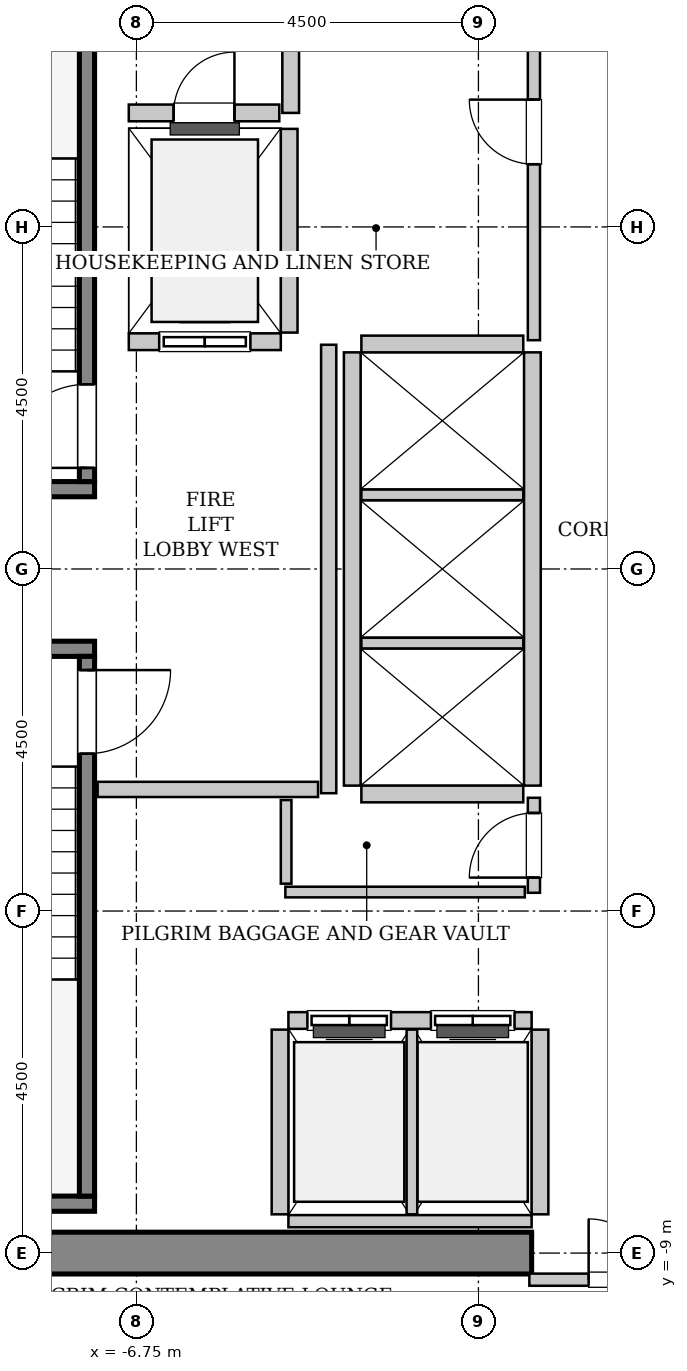
"""IFC4 building model, lengths in metres.
Left out: names, types, materials, properties, quantities, classifications, styles, units other than length and angle.
Written with IfcOpenShell. Run it as: python <this file> out.ifc"""

import sys

from ifc_helpers import new_model, si_unit, direction, frame, frame_2d, origin, place, context, subcontext, project, spatial, rectangle, extrude, source, transform, mapped, element, fill, save


model = new_model("IFC4")
c1 = context("Model", 3, precision=1e-05, world=origin(), true_north=direction((0.0, 1.0)))
c2 = subcontext(c1, "Body", "Model", "MODEL_VIEW")
j1 = project(units=[si_unit("LENGTHUNIT", "METRE"), si_unit("PLANEANGLEUNIT", "RADIAN")], contexts=[c1])
p1 = place(None, origin())
s1 = spatial("IfcSite", under=j1, at=p1, CompositionType="ELEMENT")
p2 = place(p1, origin())
s2 = spatial("IfcBuilding", under=s1, at=p2, CompositionType="ELEMENT")
p3 = place(p2, frame((0.0, 0.0, 175.4)))
s3 = spatial("IfcBuildingStorey", under=s2, at=p3, CompositionType="ELEMENT", Elevation=175.4)
m1 = source(origin(), c2, "Body", "SweptSolid", [
    extrude(rectangle(XDim=9.975, YDim=0.55, at=frame_2d((4.987, 0.0))), origin(), (0.0, 0.0, 1.0), 3.8),
])
p4 = place(p3, frame((-11.525, -9.0, 0.0), z_axis=(0.0, 0.0, 1.0), x_axis=(1.0, 0.0, 0.0)))
e1 = element("IfcWall", 1, at=p4, inside=s3, PredefinedType="SHEAR", context=c2, shape_type="MappedRepresentation", body=[
    mapped(m1, transform((0.0, 0.0, 0.0), x_axis=(1.0, 0.0, 0.0), y_axis=(0.0, 1.0, 0.0), z_axis=(0.0, 0.0, 1.0), scale=1.0)),
])
m2 = source(origin(), c2, "Body", "SweptSolid", [
    extrude(rectangle(XDim=3.4, YDim=0.2, at=frame_2d((1.7, 0.0))), origin(), (0.0, 0.0, 1.0), 3.8),
])
p5 = place(p3, frame((-7.3, 1.05, 0.0), z_axis=(0.0, 0.0, 1.0), x_axis=(-1.0, 0.0, 0.0)))
e2 = element("IfcWall", 2, at=p5, inside=s3, PredefinedType="SOLIDWALL", context=c2, shape_type="MappedRepresentation", body=[
    mapped(m2, transform((0.0, 0.0, 0.0), x_axis=(1.0, 0.0, 0.0), y_axis=(0.0, 1.0, 0.0), z_axis=(0.0, 0.0, 1.0), scale=1.0)),
])
m3 = source(origin(), c2, "Body", "SweptSolid", [
    extrude(rectangle(XDim=7.1, YDim=0.2, at=frame_2d((3.55, 0.0))), origin(), (0.0, 0.0, 1.0), 3.8),
])
p6 = place(p3, frame((-7.4, 1.15, 0.0), z_axis=(0.0, 0.0, 1.0), x_axis=(0.0, 1.0, 0.0)))
e3 = element("IfcWall", 3, at=p6, inside=s3, PredefinedType="SOLIDWALL", context=c2, shape_type="MappedRepresentation", body=[
    mapped(m3, transform((0.0, 0.0, 0.0), x_axis=(1.0, 0.0, 0.0), y_axis=(0.0, 1.0, 0.0), z_axis=(0.0, 0.0, 1.0), scale=1.0)),
])
p7 = place(p6, frame((0.18, 0.0, 0.0)))
e4 = element("IfcOpeningElement", 4, at=p7, cuts=e3, PredefinedType="OPENING", context=c2, shape_type="SweptSolid", body=[
    extrude(rectangle(XDim=1.1, YDim=2.15, at=frame_2d((0.55, 1.075))), frame((0.0, 0.11, 0.0), z_axis=(0.0, -1.0, 0.0), x_axis=(1.0, 0.0, 0.0)), (0.0, 0.0, 1.0), 0.22),
])
p8 = place(p3, frame((-10.7, -1.05, 0.0), z_axis=(0.0, 0.0, 1.0), x_axis=(1.0, 0.0, 0.0)))
e5 = element("IfcWall", 5, at=p8, inside=s3, PredefinedType="SOLIDWALL", context=c2, shape_type="MappedRepresentation", body=[
    mapped(m2, transform((0.0, 0.0, 0.0), x_axis=(1.0, 0.0, 0.0), y_axis=(0.0, 1.0, 0.0), z_axis=(0.0, 0.0, 1.0), scale=1.0)),
])
m4 = source(origin(), c2, "Body", "SweptSolid", [
    extrude(rectangle(XDim=3.68, YDim=0.2, at=frame_2d((1.84, 0.0))), origin(), (0.0, 0.0, 1.0), 3.8),
])
p9 = place(p3, frame((-10.98, -8.35, 0.0), z_axis=(0.0, 0.0, 1.0), x_axis=(1.0, 0.0, 0.0)))
e6 = element("IfcWall", 6, at=p9, inside=s3, PredefinedType="SOLIDWALL", context=c2, shape_type="MappedRepresentation", body=[
    mapped(m4, transform((0.0, 0.0, 0.0), x_axis=(1.0, 0.0, 0.0), y_axis=(0.0, 1.0, 0.0), z_axis=(0.0, 0.0, 1.0), scale=1.0)),
])
p10 = place(p3, frame((-7.4, -1.15, 0.0), z_axis=(0.0, 0.0, 1.0), x_axis=(0.0, -1.0, 0.0)))
e7 = element("IfcWall", 7, at=p10, inside=s3, PredefinedType="SOLIDWALL", context=c2, shape_type="MappedRepresentation", body=[
    mapped(m3, transform((0.0, 0.0, 0.0), x_axis=(1.0, 0.0, 0.0), y_axis=(0.0, 1.0, 0.0), z_axis=(0.0, 0.0, 1.0), scale=1.0)),
])
p11 = place(p10, frame((0.18, 0.0, 0.0)))
e8 = element("IfcOpeningElement", 8, at=p11, cuts=e7, PredefinedType="OPENING", context=c2, shape_type="SweptSolid", body=[
    extrude(rectangle(XDim=1.1, YDim=2.15, at=frame_2d((0.55, 1.075))), frame((0.0, 0.11, 0.0), z_axis=(0.0, -1.0, 0.0), x_axis=(1.0, 0.0, 0.0)), (0.0, 0.0, 1.0), 0.22),
])
m5 = source(origin(), c2, "Body", "SweptSolid", [
    extrude(rectangle(XDim=2.0, YDim=0.22, at=frame_2d((1.0, 0.0))), origin(), (0.0, 0.0, 1.0), 3.535),
])
p12 = place(p3, frame((-6.85, 2.99, 0.0), z_axis=(0.0, 0.0, 1.0), x_axis=(1.0, 0.0, 0.0)))
e9 = element("IfcWall", 9, at=p12, inside=s3, PredefinedType="SOLIDWALL", context=c2, shape_type="MappedRepresentation", body=[
    mapped(m5, transform((0.0, 0.0, 0.0), x_axis=(1.0, 0.0, 0.0), y_axis=(0.0, 1.0, 0.0), z_axis=(0.0, 0.0, 1.0), scale=1.0)),
])
p13 = place(p12, frame((0.4, 0.0, 0.0)))
e10 = element("IfcOpeningElement", 10, at=p13, cuts=e9, PredefinedType="OPENING", context=c2, shape_type="SweptSolid", body=[
    extrude(rectangle(XDim=1.2, YDim=2.2, at=frame_2d((0.6, 1.1))), frame((0.0, 0.12, 0.0), z_axis=(0.0, -1.0, 0.0), x_axis=(1.0, 0.0, 0.0)), (0.0, 0.0, 1.0), 0.24),
])
m6 = source(origin(), c2, "Body", "SweptSolid", [
    extrude(rectangle(XDim=2.68, YDim=0.22, at=frame_2d((1.34, 0.0))), origin(), (0.0, 0.0, 1.0), 3.535),
])
p14 = place(p3, frame((-4.74, 3.11, 0.0), z_axis=(0.0, 0.0, 1.0), x_axis=(0.0, 1.0, 0.0)))
e11 = element("IfcWall", 11, at=p14, inside=s3, PredefinedType="SOLIDWALL", context=c2, shape_type="MappedRepresentation", body=[
    mapped(m6, transform((0.0, 0.0, 0.0), x_axis=(1.0, 0.0, 0.0), y_axis=(0.0, 1.0, 0.0), z_axis=(0.0, 0.0, 1.0), scale=1.0)),
])
m7 = source(origin(), c2, "Body", "SweptSolid", [
    extrude(rectangle(XDim=3.2, YDim=0.22, at=frame_2d((1.6, 0.0))), origin(), (0.0, 0.0, 1.0), 3.535),
])
p15 = place(p3, frame((-1.55, -5.94, 0.0), z_axis=(0.0, 0.0, 1.0), x_axis=(-1.0, 0.0, 0.0)))
e12 = element("IfcWall", 12, at=p15, inside=s3, PredefinedType="SOLIDWALL", context=c2, shape_type="MappedRepresentation", body=[
    mapped(m7, transform((0.0, 0.0, 0.0), x_axis=(1.0, 0.0, 0.0), y_axis=(0.0, 1.0, 0.0), z_axis=(0.0, 0.0, 1.0), scale=1.0)),
])
p16 = place(p15, frame((1.85, 0.0, 0.0)))
e13 = element("IfcOpeningElement", 13, at=p16, cuts=e12, PredefinedType="OPENING", context=c2, shape_type="SweptSolid", body=[
    extrude(rectangle(XDim=1.1, YDim=2.2, at=frame_2d((0.55, 1.1))), frame((0.0, 0.12, 0.0), z_axis=(0.0, -1.0, 0.0), x_axis=(1.0, 0.0, 0.0)), (0.0, 0.0, 1.0), 0.24),
])
p17 = place(p15, frame((0.225, 0.0, 0.0)))
e14 = element("IfcOpeningElement", 14, at=p17, cuts=e12, PredefinedType="OPENING", context=c2, shape_type="SweptSolid", body=[
    extrude(rectangle(XDim=1.1, YDim=2.2, at=frame_2d((0.55, 1.1))), frame((0.0, 0.12, 0.0), z_axis=(0.0, -1.0, 0.0), x_axis=(1.0, 0.0, 0.0)), (0.0, 0.0, 1.0), 0.24),
])
m8 = source(origin(), c2, "Body", "SweptSolid", [
    extrude(rectangle(XDim=3.2, YDim=0.16, at=frame_2d((1.6, 0.0))), origin(), (0.0, 0.0, 1.0), 2.425),
])
p18 = place(p3, frame((-4.75, -8.58, 0.0), z_axis=(0.0, 0.0, 1.0), x_axis=(1.0, 0.0, 0.0)))
e15 = element("IfcWall", 15, at=p18, inside=s3, PredefinedType="PARTITIONING", context=c2, shape_type="MappedRepresentation", body=[
    mapped(m8, transform((0.0, 0.0, 0.0), x_axis=(1.0, 0.0, 0.0), y_axis=(0.0, 1.0, 0.0), z_axis=(0.0, 0.0, 1.0), scale=1.0)),
])
m9 = source(origin(), c2, "Body", "SweptSolid", [
    extrude(rectangle(XDim=2.43, YDim=0.22, at=frame_2d((1.215, 0.0))), origin(), (0.0, 0.0, 1.0), 3.535),
])
p19 = place(p3, frame((-4.86, -6.06, 0.0), z_axis=(0.0, 0.0, 1.0), x_axis=(0.0, -1.0, 0.0)))
e16 = element("IfcWall", 16, at=p19, inside=s3, PredefinedType="SOLIDWALL", context=c2, shape_type="MappedRepresentation", body=[
    mapped(m9, transform((0.0, 0.0, 0.0), x_axis=(1.0, 0.0, 0.0), y_axis=(0.0, 1.0, 0.0), z_axis=(0.0, 0.0, 1.0), scale=1.0)),
])
m10 = source(origin(), c2, "Body", "SweptSolid", [
    extrude(rectangle(XDim=2.43, YDim=0.14, at=frame_2d((1.215, 0.0))), origin(), (0.0, 0.0, 1.0), 3.535),
])
p20 = place(p3, frame((-3.125, -8.49, 0.0), z_axis=(0.0, 0.0, 1.0), x_axis=(0.0, 1.0, 0.0)))
e17 = element("IfcWall", 17, at=p20, inside=s3, PredefinedType="PARTITIONING", context=c2, shape_type="MappedRepresentation", body=[
    mapped(m10, transform((0.0, 0.0, 0.0), x_axis=(1.0, 0.0, 0.0), y_axis=(0.0, 1.0, 0.0), z_axis=(0.0, 0.0, 1.0), scale=1.0)),
])
p21 = place(p3, frame((-1.44, -8.49, 0.0), z_axis=(0.0, 0.0, 1.0), x_axis=(0.0, 1.0, 0.0)))
e18 = element("IfcWall", 18, at=p21, inside=s3, PredefinedType="SOLIDWALL", context=c2, shape_type="MappedRepresentation", body=[
    mapped(m9, transform((0.0, 0.0, 0.0), x_axis=(1.0, 0.0, 0.0), y_axis=(0.0, 1.0, 0.0), z_axis=(0.0, 0.0, 1.0), scale=1.0)),
])
m11 = source(origin(), c2, "Body", "SweptSolid", [
    extrude(rectangle(XDim=5.7, YDim=0.22, at=frame_2d((2.85, 0.0))), origin(), (0.0, 0.0, 1.0), 3.535),
])
for number, where, z_axis, x_axis in (
    (19, (-1.54, -2.85, 0.0), (0.0, 0.0, 1.0), (0.0, 1.0, 0.0)),
    (20, (-3.91, 2.85, 0.0), (0.0, 0.0, 1.0), (0.0, -1.0, 0.0)),
):
    element("IfcWall", number, at=place(p3, frame(where, z_axis=z_axis, x_axis=x_axis)), inside=s3, PredefinedType="SOLIDWALL", context=c2, shape_type="MappedRepresentation", body=[
        mapped(m11, transform((0.0, 0.0, 0.0), x_axis=(1.0, 0.0, 0.0), y_axis=(0.0, 1.0, 0.0), z_axis=(0.0, 0.0, 1.0), scale=1.0)),
    ])
m12 = source(origin(), c2, "Body", "SweptSolid", [
    extrude(rectangle(XDim=2.13, YDim=0.22, at=frame_2d((1.065, 0.0))), origin(), (0.0, 0.0, 1.0), 3.535),
])
p22 = place(p3, frame((-3.79, -2.96, 0.0), z_axis=(0.0, 0.0, 1.0), x_axis=(1.0, 0.0, 0.0)))
e21 = element("IfcWall", 21, at=p22, inside=s3, PredefinedType="SOLIDWALL", context=c2, shape_type="MappedRepresentation", body=[
    mapped(m12, transform((0.0, 0.0, 0.0), x_axis=(1.0, 0.0, 0.0), y_axis=(0.0, 1.0, 0.0), z_axis=(0.0, 0.0, 1.0), scale=1.0)),
])
m13 = source(origin(), c2, "Body", "SweptSolid", [
    extrude(rectangle(XDim=2.13, YDim=0.14, at=frame_2d((1.065, 0.0))), origin(), (0.0, 0.0, 1.0), 3.535),
])
for number, where, z_axis, x_axis in (
    (22, (-3.79, -0.975, 0.0), (0.0, 0.0, 1.0), (1.0, 0.0, 0.0)),
    (23, (-3.79, 0.975, 0.0), (0.0, 0.0, 1.0), (1.0, 0.0, 0.0)),
):
    element("IfcWall", number, at=place(p3, frame(where, z_axis=z_axis, x_axis=x_axis)), inside=s3, PredefinedType="PARTITIONING", context=c2, shape_type="MappedRepresentation", body=[
        mapped(m13, transform((0.0, 0.0, 0.0), x_axis=(1.0, 0.0, 0.0), y_axis=(0.0, 1.0, 0.0), z_axis=(0.0, 0.0, 1.0), scale=1.0)),
    ])
p23 = place(p3, frame((-1.66, 2.96, 0.0), z_axis=(0.0, 0.0, 1.0), x_axis=(-1.0, 0.0, 0.0)))
e24 = element("IfcWall", 24, at=p23, inside=s3, PredefinedType="SOLIDWALL", context=c2, shape_type="MappedRepresentation", body=[
    mapped(m12, transform((0.0, 0.0, 0.0), x_axis=(1.0, 0.0, 0.0), y_axis=(0.0, 1.0, 0.0), z_axis=(0.0, 0.0, 1.0), scale=1.0)),
])
m14 = source(origin(), c2, "Body", "SweptSolid", [
    extrude(rectangle(XDim=2.25, YDim=0.22, at=frame_2d((1.125, 0.0))), origin(), (0.0, 0.0, 1.0), 3.535),
])
p24 = place(p3, frame((-4.72, 6.0, 0.0), z_axis=(0.0, 0.0, 1.0), x_axis=(0.0, 1.0, 0.0)))
e25 = element("IfcWall", 25, at=p24, inside=s3, PredefinedType="SOLIDWALL", context=c2, shape_type="MappedRepresentation", body=[
    mapped(m14, transform((0.0, 0.0, 0.0), x_axis=(1.0, 0.0, 0.0), y_axis=(0.0, 1.0, 0.0), z_axis=(0.0, 0.0, 1.0), scale=1.0)),
])
m15 = source(origin(), c2, "Body", "SweptSolid", [
    extrude(rectangle(XDim=1.98, YDim=0.22, at=frame_2d((0.99, 0.0))), origin(), (0.0, 0.0, 1.0), 3.535),
])
p25 = place(p3, frame((-6.85, 6.0, 0.0), z_axis=(0.0, 0.0, 1.0), x_axis=(1.0, 0.0, 0.0)))
e26 = element("IfcWall", 26, at=p25, inside=s3, PredefinedType="SOLIDWALL", context=c2, shape_type="MappedRepresentation", body=[
    mapped(m15, transform((0.0, 0.0, 0.0), x_axis=(1.0, 0.0, 0.0), y_axis=(0.0, 1.0, 0.0), z_axis=(0.0, 0.0, 1.0), scale=1.0)),
])
p26 = place(p25, frame((0.59, 0.0, 0.0)))
e27 = element("IfcOpeningElement", 27, at=p26, cuts=e26, PredefinedType="OPENING", context=c2, shape_type="SweptSolid", body=[
    extrude(rectangle(XDim=0.8, YDim=2.0, at=frame_2d((0.4, 1.0))), frame((0.0, 0.12, 0.0), z_axis=(0.0, -1.0, 0.0), x_axis=(1.0, 0.0, 0.0)), (0.0, 0.0, 1.0), 0.24),
])
m16 = source(origin(), c2, "Body", "SweptSolid", [
    extrude(rectangle(XDim=5.9, YDim=0.2, at=frame_2d((2.95, 0.0))), origin(), (0.0, 0.0, 1.0), 3.535),
])
p27 = place(p3, frame((-4.22, -2.95, 0.0), z_axis=(0.0, 0.0, 1.0), x_axis=(0.0, 1.0, 0.0)))
e28 = element("IfcWall", 28, at=p27, inside=s3, PredefinedType="PARTITIONING", context=c2, shape_type="MappedRepresentation", body=[
    mapped(m16, transform((0.0, 0.0, 0.0), x_axis=(1.0, 0.0, 0.0), y_axis=(0.0, 1.0, 0.0), z_axis=(0.0, 0.0, 1.0), scale=1.0)),
])
m17 = source(origin(), c2, "Body", "SweptSolid", [
    extrude(rectangle(XDim=2.9, YDim=0.2, at=frame_2d((1.45, 0.0))), origin(), (0.0, 0.0, 1.0), 3.535),
])
p28 = place(p3, frame((-7.26, -2.9, 0.0), z_axis=(0.0, 0.0, 1.0), x_axis=(1.0, 0.0, 0.0)))
e29 = element("IfcWall", 29, at=p28, inside=s3, PredefinedType="PARTITIONING", context=c2, shape_type="MappedRepresentation", body=[
    mapped(m17, transform((0.0, 0.0, 0.0), x_axis=(1.0, 0.0, 0.0), y_axis=(0.0, 1.0, 0.0), z_axis=(0.0, 0.0, 1.0), scale=1.0)),
])
m18 = source(origin(), c2, "Body", "SweptSolid", [
    extrude(rectangle(XDim=3.16, YDim=0.16, at=frame_2d((1.58, 0.0))), origin(), (0.0, 0.0, 1.0), 2.425),
])
p29 = place(p3, frame((-1.58, -9.35, 0.0), z_axis=(0.0, 0.0, 1.0), x_axis=(1.0, 0.0, 0.0)))
e30 = element("IfcWall", 30, at=p29, inside=s3, PredefinedType="PARTITIONING", context=c2, shape_type="MappedRepresentation", body=[
    mapped(m18, transform((0.0, 0.0, 0.0), x_axis=(1.0, 0.0, 0.0), y_axis=(0.0, 1.0, 0.0), z_axis=(0.0, 0.0, 1.0), scale=1.0)),
])
p30 = place(p29, frame((0.78, 0.0, 0.0)))
e31 = element("IfcOpeningElement", 31, at=p30, cuts=e30, PredefinedType="OPENING", context=c2, shape_type="SweptSolid", body=[
    extrude(rectangle(XDim=1.6, YDim=2.3, at=frame_2d((0.8, 1.15))), frame((0.0, 0.09, 0.0), z_axis=(0.0, -1.0, 0.0), x_axis=(1.0, 0.0, 0.0)), (0.0, 0.0, 1.0), 0.18),
])
m19 = source(origin(), c2, "Body", "SweptSolid", [
    extrude(rectangle(XDim=5.48, YDim=0.16, at=frame_2d((2.74, 0.0))), origin(), (0.0, 0.0, 1.0), 3.535),
])
p31 = place(p3, frame((-1.52, 3.01, 0.0), z_axis=(0.0, 0.0, 1.0), x_axis=(0.0, 1.0, 0.0)))
e32 = element("IfcWall", 32, at=p31, inside=s3, PredefinedType="PARTITIONING", context=c2, shape_type="MappedRepresentation", body=[
    mapped(m19, transform((0.0, 0.0, 0.0), x_axis=(1.0, 0.0, 0.0), y_axis=(0.0, 1.0, 0.0), z_axis=(0.0, 0.0, 1.0), scale=1.0)),
])
p32 = place(p31, frame((2.315, 0.0, 0.0)))
e33 = element("IfcOpeningElement", 33, at=p32, cuts=e32, PredefinedType="OPENING", context=c2, shape_type="SweptSolid", body=[
    extrude(rectangle(XDim=0.85, YDim=2.1, at=frame_2d((0.425, 1.05))), frame((0.0, 0.09, 0.0), z_axis=(0.0, -1.0, 0.0), x_axis=(1.0, 0.0, 0.0)), (0.0, 0.0, 1.0), 0.18),
])
m20 = source(origin(), c2, "Body", "SweptSolid", [
    extrude(rectangle(XDim=1.25, YDim=0.16, at=frame_2d((0.625, 0.0))), origin(), (0.0, 0.0, 1.0), 3.535),
])
p33 = place(p3, frame((-1.52, -4.26, 0.0), z_axis=(0.0, 0.0, 1.0), x_axis=(0.0, 1.0, 0.0)))
e34 = element("IfcWall", 34, at=p33, inside=s3, PredefinedType="PARTITIONING", context=c2, shape_type="MappedRepresentation", body=[
    mapped(m20, transform((0.0, 0.0, 0.0), x_axis=(1.0, 0.0, 0.0), y_axis=(0.0, 1.0, 0.0), z_axis=(0.0, 0.0, 1.0), scale=1.0)),
])
p34 = place(p33, frame((0.2, 0.0, 0.0)))
e35 = element("IfcOpeningElement", 35, at=p34, cuts=e34, PredefinedType="OPENING", context=c2, shape_type="SweptSolid", body=[
    extrude(rectangle(XDim=0.85, YDim=2.1, at=frame_2d((0.425, 1.05))), frame((0.0, 0.09, 0.0), z_axis=(0.0, -1.0, 0.0), x_axis=(1.0, 0.0, 0.0)), (0.0, 0.0, 1.0), 0.18),
])
m21 = source(origin(), c2, "Body", "SweptSolid", [
    extrude(rectangle(XDim=3.15, YDim=0.14, at=frame_2d((1.575, 0.0))), origin(), (0.0, 0.0, 1.0), 3.535),
])
p35 = place(p3, frame((-4.79, -4.25, 0.0), z_axis=(0.0, 0.0, 1.0), x_axis=(1.0, 0.0, 0.0)))
e36 = element("IfcWall", 36, at=p35, inside=s3, PredefinedType="PARTITIONING", context=c2, shape_type="MappedRepresentation", body=[
    mapped(m21, transform((0.0, 0.0, 0.0), x_axis=(1.0, 0.0, 0.0), y_axis=(0.0, 1.0, 0.0), z_axis=(0.0, 0.0, 1.0), scale=1.0)),
])
m22 = source(origin(), c2, "Body", "SweptSolid", [
    extrude(rectangle(XDim=1.1, YDim=0.14, at=frame_2d((0.55, 0.0))), origin(), (0.0, 0.0, 1.0), 3.535),
])
p36 = place(p3, frame((-4.78, -4.14, 0.0), z_axis=(0.0, 0.0, 1.0), x_axis=(0.0, 1.0, 0.0)))
e37 = element("IfcWall", 37, at=p36, inside=s3, PredefinedType="PARTITIONING", context=c2, shape_type="MappedRepresentation", body=[
    mapped(m22, transform((0.0, 0.0, 0.0), x_axis=(1.0, 0.0, 0.0), y_axis=(0.0, 1.0, 0.0), z_axis=(0.0, 0.0, 1.0), scale=1.0)),
])
m23 = source(origin(), c2, "Body", "SweptSolid", [
    extrude(rectangle(XDim=1.1, YDim=2.15, at=frame_2d((0.55, 1.075))), frame((0.0, 0.025, 0.0), z_axis=(0.0, -1.0, 0.0), x_axis=(1.0, 0.0, 0.0)), (0.0, 0.0, 1.0), 0.05),
])
p37 = place(p7, origin())
e38 = element("IfcDoor", 38, at=p37, inside=s3, OperationType="SINGLE_SWING_LEFT", PredefinedType="DOOR", context=c2, shape_type="MappedRepresentation", body=[
    mapped(m23, transform((0.0, 0.0, 0.0), x_axis=(1.0, 0.0, 0.0), y_axis=(0.0, 1.0, 0.0), z_axis=(0.0, 0.0, 1.0), scale=1.0)),
])
fill(e4, e38)
p38 = place(p11, origin())
e39 = element("IfcDoor", 39, at=p38, inside=s3, OperationType="SINGLE_SWING_LEFT", PredefinedType="DOOR", context=c2, shape_type="MappedRepresentation", body=[
    mapped(m23, transform((0.0, 0.0, 0.0), x_axis=(1.0, 0.0, 0.0), y_axis=(0.0, 1.0, 0.0), z_axis=(0.0, 0.0, 1.0), scale=1.0)),
])
fill(e8, e39)
m24 = source(origin(), c2, "Body", "SweptSolid", [
    extrude(rectangle(XDim=1.2, YDim=2.2, at=frame_2d((0.6, 1.1))), frame((0.0, 0.025, 0.0), z_axis=(0.0, -1.0, 0.0), x_axis=(1.0, 0.0, 0.0)), (0.0, 0.0, 1.0), 0.05),
])
p39 = place(p13, origin())
e40 = element("IfcDoor", 40, at=p39, inside=s3, OperationType="SLIDING_TO_LEFT", PredefinedType="DOOR", context=c2, shape_type="MappedRepresentation", body=[
    mapped(m24, transform((0.0, 0.0, 0.0), x_axis=(1.0, 0.0, 0.0), y_axis=(0.0, 1.0, 0.0), z_axis=(0.0, 0.0, 1.0), scale=1.0)),
])
fill(e10, e40)
m25 = source(origin(), c2, "Body", "SweptSolid", [
    extrude(rectangle(XDim=1.1, YDim=2.2, at=frame_2d((0.55, 1.1))), frame((0.0, 0.025, 0.0), z_axis=(0.0, -1.0, 0.0), x_axis=(1.0, 0.0, 0.0)), (0.0, 0.0, 1.0), 0.05),
])
p40 = place(p16, origin())
e41 = element("IfcDoor", 41, at=p40, inside=s3, OperationType="DOUBLE_DOOR_SLIDING", PredefinedType="DOOR", context=c2, shape_type="MappedRepresentation", body=[
    mapped(m25, transform((0.0, 0.0, 0.0), x_axis=(1.0, 0.0, 0.0), y_axis=(0.0, 1.0, 0.0), z_axis=(0.0, 0.0, 1.0), scale=1.0)),
])
fill(e13, e41)
p41 = place(p17, origin())
e42 = element("IfcDoor", 42, at=p41, inside=s3, OperationType="DOUBLE_DOOR_SLIDING", PredefinedType="DOOR", context=c2, shape_type="MappedRepresentation", body=[
    mapped(m25, transform((0.0, 0.0, 0.0), x_axis=(1.0, 0.0, 0.0), y_axis=(0.0, 1.0, 0.0), z_axis=(0.0, 0.0, 1.0), scale=1.0)),
])
fill(e14, e42)
m26 = source(origin(), c2, "Body", "SweptSolid", [
    extrude(rectangle(XDim=0.8, YDim=2.0, at=frame_2d((0.4, 1.0))), frame((0.0, 0.025, 0.0), z_axis=(0.0, -1.0, 0.0), x_axis=(1.0, 0.0, 0.0)), (0.0, 0.0, 1.0), 0.05),
])
p42 = place(p26, origin())
e43 = element("IfcDoor", 43, at=p42, inside=s3, OperationType="SINGLE_SWING_RIGHT", PredefinedType="TRAPDOOR", context=c2, shape_type="MappedRepresentation", body=[
    mapped(m26, transform((0.0, 0.0, 0.0), x_axis=(1.0, 0.0, 0.0), y_axis=(0.0, 1.0, 0.0), z_axis=(0.0, 0.0, 1.0), scale=1.0)),
])
fill(e27, e43)
m27 = source(origin(), c2, "Body", "SweptSolid", [
    extrude(rectangle(XDim=1.6, YDim=2.3, at=frame_2d((0.8, 1.15))), frame((0.0, 0.025, 0.0), z_axis=(0.0, -1.0, 0.0), x_axis=(1.0, 0.0, 0.0)), (0.0, 0.0, 1.0), 0.05),
])
p43 = place(p30, origin())
e44 = element("IfcDoor", 44, at=p43, inside=s3, OperationType="DOUBLE_DOOR_SINGLE_SWING", PredefinedType="DOOR", context=c2, shape_type="MappedRepresentation", body=[
    mapped(m27, transform((0.0, 0.0, 0.0), x_axis=(1.0, 0.0, 0.0), y_axis=(0.0, 1.0, 0.0), z_axis=(0.0, 0.0, 1.0), scale=1.0)),
])
fill(e31, e44)
m28 = source(origin(), c2, "Body", "SweptSolid", [
    extrude(rectangle(XDim=0.85, YDim=2.1, at=frame_2d((0.425, 1.05))), frame((0.0, 0.025, 0.0), z_axis=(0.0, -1.0, 0.0), x_axis=(1.0, 0.0, 0.0)), (0.0, 0.0, 1.0), 0.05),
])
p44 = place(p32, origin())
e45 = element("IfcDoor", 45, at=p44, inside=s3, OperationType="SINGLE_SWING_RIGHT", PredefinedType="DOOR", context=c2, shape_type="MappedRepresentation", body=[
    mapped(m28, transform((0.0, 0.0, 0.0), x_axis=(1.0, 0.0, 0.0), y_axis=(0.0, 1.0, 0.0), z_axis=(0.0, 0.0, 1.0), scale=1.0)),
])
fill(e33, e45)
p45 = place(p34, origin())
e46 = element("IfcDoor", 46, at=p45, inside=s3, OperationType="SINGLE_SWING_LEFT", PredefinedType="DOOR", context=c2, shape_type="MappedRepresentation", body=[
    mapped(m28, transform((0.0, 0.0, 0.0), x_axis=(1.0, 0.0, 0.0), y_axis=(0.0, 1.0, 0.0), z_axis=(0.0, 0.0, 1.0), scale=1.0)),
])
fill(e35, e46)
save(model, sys.argv[1])
